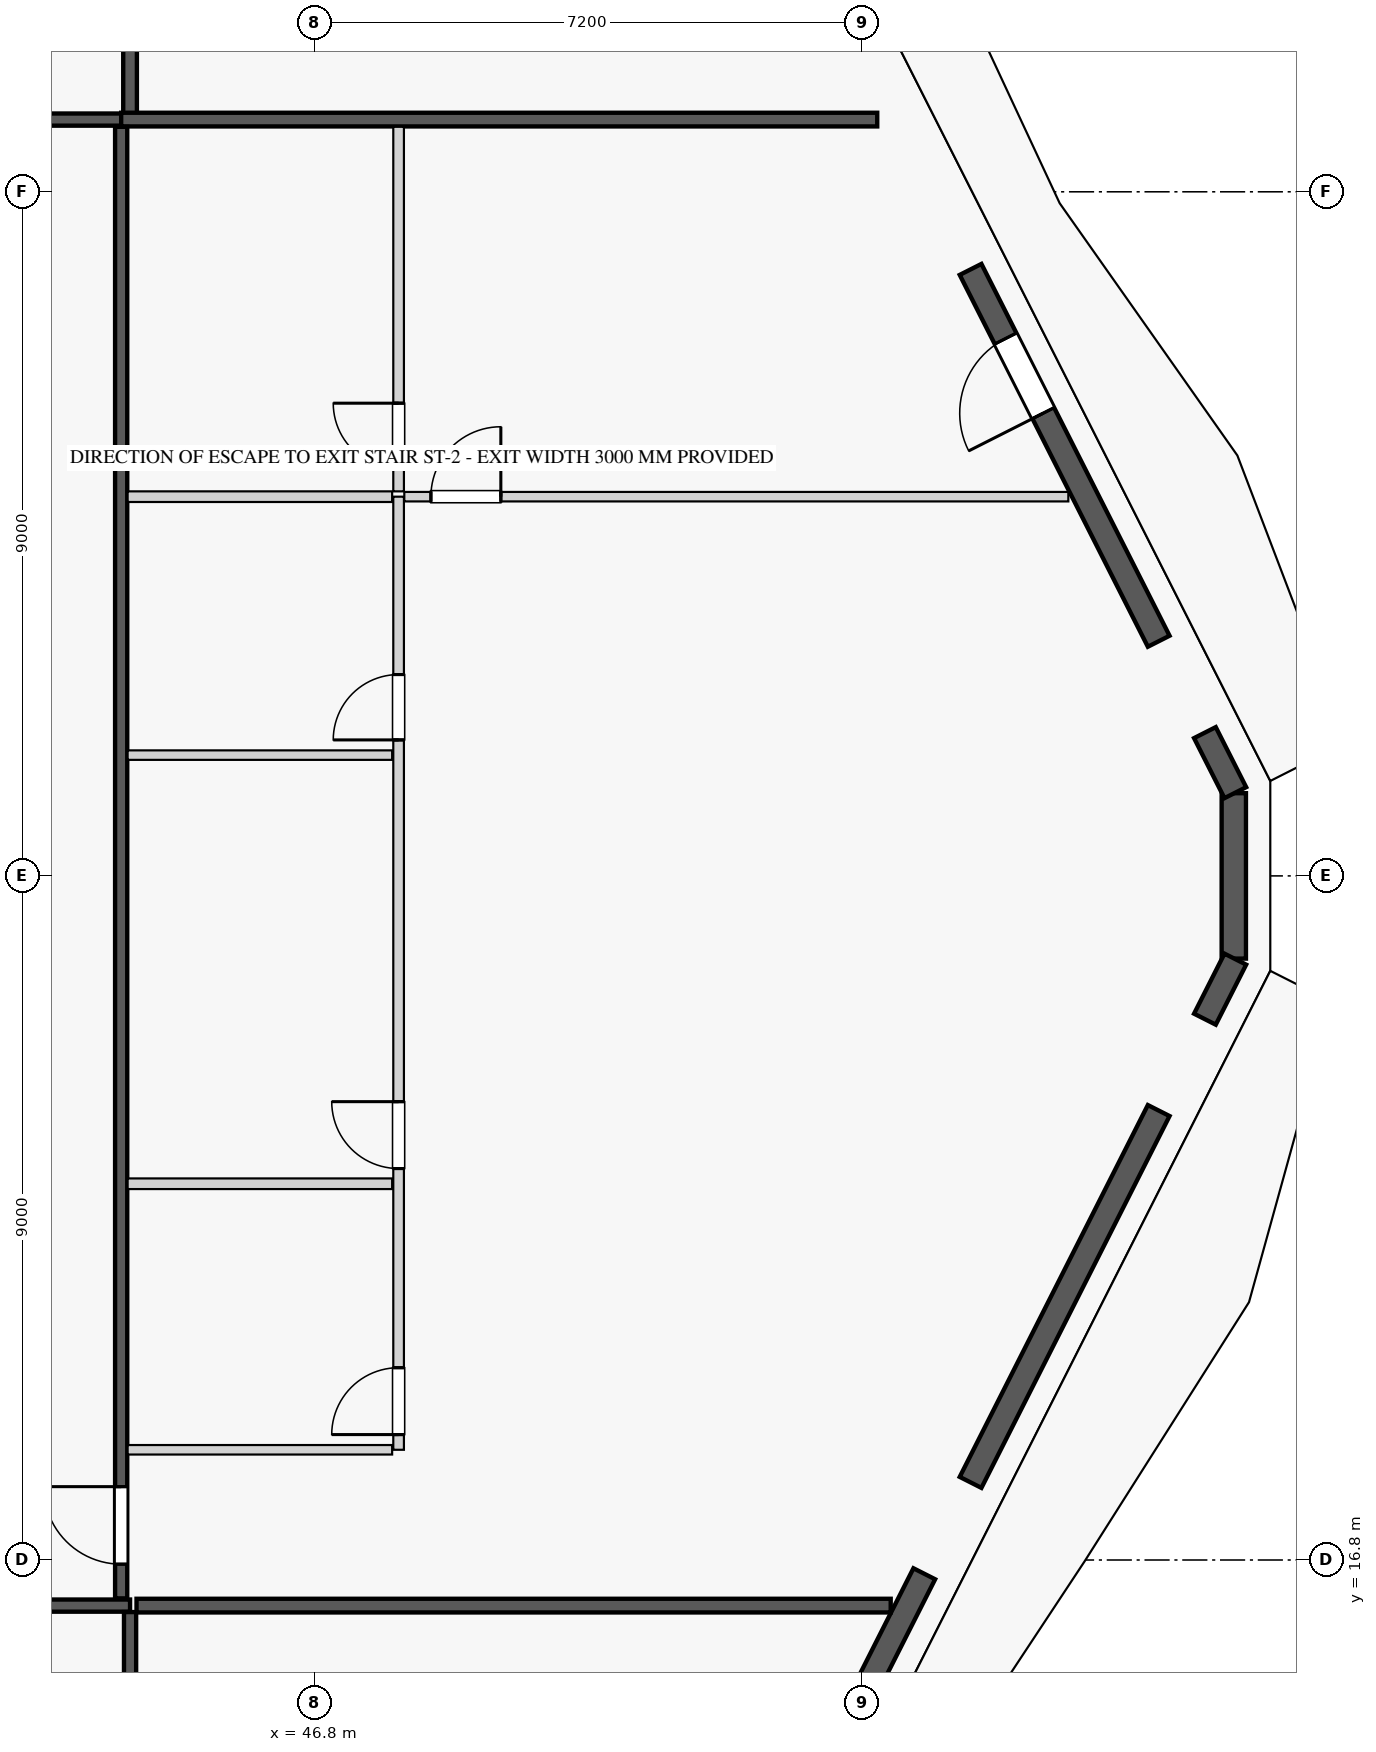
"""IFC4 building model, lengths in metres.
Left out: names, types, materials, properties, quantities, classifications, styles, units other than length and angle.
Written with IfcOpenShell. Run it as: python <this file> out.ifc"""

import sys

from ifc_helpers import new_model, si_unit, direction, frame, frame_2d, origin, origin_2d, place, context, subcontext, project, spatial, rectangle, extrude, element, fill, save


model = new_model("IFC4")
c1 = context("Model", 3, precision=1e-05, world=origin(), true_north=direction((0.0, 1.0)))
c2 = subcontext(c1, "Body", "Model", "MODEL_VIEW")
j1 = project(units=[si_unit("LENGTHUNIT", "METRE"), si_unit("PLANEANGLEUNIT", "RADIAN")], contexts=[c1])
p1 = place(None, origin())
s1 = spatial("IfcSite", under=j1, at=p1, CompositionType="ELEMENT")
p2 = place(p1, origin())
s2 = spatial("IfcBuilding", under=s1, at=p2, CompositionType="ELEMENT")
p3 = place(p2, frame((0.0, 0.0, 94.2)))
s3 = spatial("IfcBuildingStorey", under=s2, at=p3, CompositionType="ELEMENT", Elevation=94.2)
for number, where, z_axis, x_axis in (
    (1, (55.046, 17.22, 0.0), (0.0, 0.0, 1.0), (1.0, 0.0, 0.0)),
    (2, (58.168, 23.314, 0.0), (0.0, 0.0, 1.0), (1.0, 0.0, 0.0)),
    (3, (58.168, 28.286, 0.0), (0.0, 0.0, 1.0), (1.0, 0.0, 0.0)),
    (4, (55.046, 34.38, 0.0), (0.0, 0.0, 1.0), (1.0, 0.0, 0.0)),
):
    element("IfcColumn", number, at=place(p3, frame(where, z_axis=z_axis, x_axis=x_axis)), inside=s3, PredefinedType="COLUMN", context=c2, shape_type="SweptSolid", body=[
        extrude(rectangle(XDim=1.05, YDim=1.05, at=origin_2d()), origin(), (0.0, 0.0, 1.0), 4.2),
    ])
p4 = place(p3, frame((58.168, 25.8, 0.0), z_axis=(0.0, 0.0, 1.0), x_axis=(0.0, 1.0, 0.0)))
e5 = element("IfcColumn", 5, at=p4, inside=s3, PredefinedType="PILASTER", context=c2, shape_type="SweptSolid", body=[
    extrude(rectangle(XDim=0.5, YDim=0.35, at=origin_2d()), origin(), (0.0, 0.0, 1.0), 4.2),
])
p5 = place(p3, frame((58.888, 24.712, 0.0), z_axis=(0.0, 0.0, 1.0), x_axis=(0.0, 1.0, 0.0)))
e6 = element("IfcWall", 6, at=p5, inside=s3, PredefinedType="STANDARD", context=c2, shape_type="SweptSolid", body=[
    extrude(rectangle(XDim=2.176, YDim=0.32, at=frame_2d((1.088, 0.0))), origin(), (0.0, 0.0, 1.0), 3.99),
])
p6 = place(p3, frame((52.231, 11.51, 0.0), z_axis=(0.0, 0.0, 1.0), x_axis=(0.451472515373, 0.892285026134, 0.0)))
e7 = element("IfcWall", 7, at=p6, inside=s3, PredefinedType="STANDARD", context=c2, shape_type="SweptSolid", body=[
    extrude(rectangle(XDim=5.726, YDim=0.32, at=frame_2d((2.863, 0.0))), origin(), (0.0, 0.0, 1.0), 2.59),
])
p7 = place(p6, frame((1.956, 0.0, 0.0)))
e8 = element("IfcOpeningElement", 8, at=p7, cuts=e7, PredefinedType="OPENING", context=c2, shape_type="SweptSolid", body=[
    extrude(rectangle(XDim=1.1, YDim=2.25, at=frame_2d((0.55, 1.125))), frame((0.0, 0.17, 0.0), z_axis=(0.0, -1.0, 0.0), x_axis=(1.0, 0.0, 0.0)), (0.0, 0.0, 1.0), 0.34),
])
p8 = place(p3, frame((55.425, 17.821, 0.0), z_axis=(0.0, 0.0, 1.0), x_axis=(0.451430335802, 0.892306366624, 0.0)))
e9 = element("IfcWall", 9, at=p8, inside=s3, PredefinedType="STANDARD", context=c2, shape_type="SweptSolid", body=[
    extrude(rectangle(XDim=5.482, YDim=0.32, at=frame_2d((2.741, 0.0))), origin(), (0.0, 0.0, 1.0), 2.59),
])
p9 = place(p8, frame((2.191, 0.0, 0.75)))
e10 = element("IfcOpeningElement", 10, at=p9, cuts=e9, PredefinedType="OPENING", context=c2, shape_type="SweptSolid", body=[
    extrude(rectangle(XDim=1.1, YDim=1.69, at=frame_2d((0.55, 0.845))), frame((0.0, 0.17, 0.0), z_axis=(0.0, -1.0, 0.0), x_axis=(1.0, 0.0, 0.0)), (0.0, 0.0, 1.0), 0.34),
])
for number, where, z_axis, x_axis in (
    (11, (58.508, 23.915, 0.0), (0.0, 0.0, 1.0), (0.452, 0.892, 0.0)),
    (12, (58.908, 26.895, 0.0), (0.0, 0.0, 1.0), (-0.452, 0.892, 0.0)),
):
    element("IfcWall", number, at=place(p3, frame(where, z_axis=z_axis, x_axis=x_axis)), inside=s3, PredefinedType="STANDARD", context=c2, shape_type="SweptSolid", body=[
        extrude(rectangle(XDim=0.885, YDim=0.32, at=frame_2d((0.443, 0.0))), origin(), (0.0, 0.0, 1.0), 3.99),
    ])
p10 = place(p3, frame((57.9, 28.887, 0.0), z_axis=(0.0, 0.0, 1.0), x_axis=(-0.451412397928, 0.89231544142, 0.0)))
e13 = element("IfcWall", 13, at=p10, inside=s3, PredefinedType="STANDARD", context=c2, shape_type="SweptSolid", body=[
    extrude(rectangle(XDim=5.482, YDim=0.32, at=frame_2d((2.741, 0.0))), origin(), (0.0, 0.0, 1.0), 2.59),
])
p11 = place(p10, frame((3.363, 0.0, 0.0)))
e14 = element("IfcOpeningElement", 14, at=p11, cuts=e13, PredefinedType="OPENING", context=c2, shape_type="SweptSolid", body=[
    extrude(rectangle(XDim=1.1, YDim=2.25, at=frame_2d((0.55, 1.125))), frame((0.0, 0.17, 0.0), z_axis=(0.0, -1.0, 0.0), x_axis=(1.0, 0.0, 0.0)), (0.0, 0.0, 1.0), 0.34),
])
p12 = place(p10, frame((0.507, 0.0, 0.75)))
e15 = element("IfcOpeningElement", 15, at=p12, cuts=e13, PredefinedType="OPENING", context=c2, shape_type="SweptSolid", body=[
    extrude(rectangle(XDim=1.1, YDim=1.56, at=frame_2d((0.55, 0.78))), frame((0.0, 0.17, 0.0), z_axis=(0.0, -1.0, 0.0), x_axis=(1.0, 0.0, 0.0)), (0.0, 0.0, 1.0), 0.34),
])
p13 = place(p3, frame((20.433, 16.2, 0.0), z_axis=(0.0, 0.0, 1.0), x_axis=(1.0, 0.0, 0.0)))
e16 = element("IfcWall", 16, at=p13, inside=s3, PredefinedType="PARTITIONING", context=c2, shape_type="SweptSolid", body=[
    extrude(rectangle(XDim=23.934, YDim=0.16, at=frame_2d((11.967, 0.0))), origin(), (0.0, 0.0, 1.0), 3.99),
])
p14 = place(p13, frame((0.667, 0.0, 0.0)))
e17 = element("IfcOpeningElement", 17, at=p14, cuts=e16, PredefinedType="OPENING", context=c2, shape_type="SweptSolid", body=[
    extrude(rectangle(XDim=1.35, YDim=2.35, at=frame_2d((0.675, 1.175))), frame((0.0, 0.09, 0.0), z_axis=(0.0, -1.0, 0.0), x_axis=(1.0, 0.0, 0.0)), (0.0, 0.0, 1.0), 0.18),
])
p15 = place(p13, frame((14.039, 0.0, 0.0)))
e18 = element("IfcOpeningElement", 18, at=p15, cuts=e16, PredefinedType="OPENING", context=c2, shape_type="SweptSolid", body=[
    extrude(rectangle(XDim=1.35, YDim=2.35, at=frame_2d((0.675, 1.175))), frame((0.0, 0.09, 0.0), z_axis=(0.0, -1.0, 0.0), x_axis=(1.0, 0.0, 0.0)), (0.0, 0.0, 1.0), 0.18),
])
p16 = place(p3, frame((44.367, 2.365, 0.0), z_axis=(0.0, 0.0, 1.0), x_axis=(0.0, 1.0, 0.0)))
e19 = element("IfcWall", 19, at=p16, inside=s3, PredefinedType="PARTITIONING", context=c2, shape_type="SweptSolid", body=[
    extrude(rectangle(XDim=13.75, YDim=0.16, at=frame_2d((6.875, 0.0))), origin(), (0.0, 0.0, 1.0), 2.59),
])
p17 = place(p3, frame((44.367, 35.75, 0.0), z_axis=(0.0, 0.0, 1.0), x_axis=(0.0, 1.0, 0.0)))
e20 = element("IfcWall", 20, at=p17, inside=s3, PredefinedType="PARTITIONING", context=c2, shape_type="SweptSolid", body=[
    extrude(rectangle(XDim=13.485, YDim=0.18, at=frame_2d((6.743, 0.0))), origin(), (0.0, 0.0, 1.0), 2.59),
])
p18 = place(p3, frame((36.617, 35.75, 0.0), z_axis=(0.0, 0.0, 1.0), x_axis=(1.0, 0.0, 0.0)))
e21 = element("IfcWall", 21, at=p18, inside=s3, PredefinedType="PARTITIONING", context=c2, shape_type="SweptSolid", body=[
    extrude(rectangle(XDim=7.655, YDim=0.16, at=frame_2d((3.828, 0.0))), origin(), (0.0, 0.0, 1.0), 3.99),
])
p19 = place(p18, frame((0.355, 0.0, 0.0)))
e22 = element("IfcOpeningElement", 22, at=p19, cuts=e21, PredefinedType="OPENING", context=c2, shape_type="SweptSolid", body=[
    extrude(rectangle(XDim=1.02, YDim=2.25, at=frame_2d((0.51, 1.125))), frame((0.0, 0.09, 0.0), z_axis=(0.0, -1.0, 0.0), x_axis=(1.0, 0.0, 0.0)), (0.0, 0.0, 1.0), 0.18),
])
p20 = place(p3, frame((44.452, 16.2, 0.0), z_axis=(0.0, 0.0, 1.0), x_axis=(1.0, 0.0, 0.0)))
e23 = element("IfcWall", 23, at=p20, inside=s3, PredefinedType="PARTITIONING", context=c2, shape_type="SweptSolid", body=[
    extrude(rectangle(XDim=9.922, YDim=0.18, at=frame_2d((4.961, 0.0))), origin(), (0.0, 0.0, 1.0), 3.99),
])
p21 = place(p3, frame((44.25, 35.75, 0.0), z_axis=(0.0, 0.0, 1.0), x_axis=(1.0, 0.0, 0.0)))
e24 = element("IfcWall", 24, at=p21, inside=s3, PredefinedType="PARTITIONING", context=c2, shape_type="SweptSolid", body=[
    extrude(rectangle(XDim=9.947, YDim=0.18, at=frame_2d((4.974, 0.0))), origin(), (0.0, 0.0, 1.0), 3.99),
])
p22 = place(p3, frame((44.25, 16.295, 0.0), z_axis=(0.0, 0.0, 1.0), x_axis=(0.0, 1.0, 0.0)))
e25 = element("IfcWall", 25, at=p22, inside=s3, PredefinedType="PARTITIONING", context=c2, shape_type="SweptSolid", body=[
    extrude(rectangle(XDim=19.36, YDim=0.16, at=frame_2d((9.68, 0.0))), origin(), (0.0, 0.0, 1.0), 2.59),
])
p23 = place(p22, frame((0.45, 0.0, 0.0)))
e26 = element("IfcOpeningElement", 26, at=p23, cuts=e25, PredefinedType="OPENING", context=c2, shape_type="SweptSolid", body=[
    extrude(rectangle(XDim=1.02, YDim=2.25, at=frame_2d((0.51, 1.125))), frame((0.0, 0.09, 0.0), z_axis=(0.0, -1.0, 0.0), x_axis=(1.0, 0.0, 0.0)), (0.0, 0.0, 1.0), 0.18),
])
p24 = place(p3, frame((44.335, 18.25, 0.0), z_axis=(0.0, 0.0, 1.0), x_axis=(1.0, 0.0, 0.0)))
e27 = element("IfcWall", 27, at=p24, inside=s3, PredefinedType="PARTITIONING", context=c2, shape_type="SweptSolid", body=[
    extrude(rectangle(XDim=3.48, YDim=0.125, at=frame_2d((1.74, 0.0))), origin(), (0.0, 0.0, 1.0), 2.59),
])
p25 = place(p3, frame((47.9, 18.25, 0.0), z_axis=(0.0, 0.0, 1.0), x_axis=(0.0, 1.0, 0.0)))
e28 = element("IfcWall", 28, at=p25, inside=s3, PredefinedType="PLUMBINGWALL", context=c2, shape_type="SweptSolid", body=[
    extrude(rectangle(XDim=12.539, YDim=0.14, at=frame_2d((6.27, 0.0))), origin(), (0.0, 0.0, 1.0), 3.99),
])
p26 = place(p25, frame((0.2, 0.0, 0.0)))
e29 = element("IfcOpeningElement", 29, at=p26, cuts=e28, PredefinedType="OPENING", context=c2, shape_type="SweptSolid", body=[
    extrude(rectangle(XDim=0.88, YDim=2.15, at=frame_2d((0.44, 1.075))), frame((0.0, 0.08, 0.0), z_axis=(0.0, -1.0, 0.0), x_axis=(1.0, 0.0, 0.0)), (0.0, 0.0, 1.0), 0.16),
])
p27 = place(p25, frame((3.7, 0.0, 0.0)))
e30 = element("IfcOpeningElement", 30, at=p27, cuts=e28, PredefinedType="OPENING", context=c2, shape_type="SweptSolid", body=[
    extrude(rectangle(XDim=0.88, YDim=2.15, at=frame_2d((0.44, 1.075))), frame((0.0, 0.08, 0.0), z_axis=(0.0, -1.0, 0.0), x_axis=(1.0, 0.0, 0.0)), (0.0, 0.0, 1.0), 0.16),
])
p28 = place(p25, frame((9.339, 0.0, 0.0)))
e31 = element("IfcOpeningElement", 31, at=p28, cuts=e28, PredefinedType="OPENING", context=c2, shape_type="SweptSolid", body=[
    extrude(rectangle(XDim=0.86, YDim=2.1, at=frame_2d((0.43, 1.05))), frame((0.0, 0.08, 0.0), z_axis=(0.0, -1.0, 0.0), x_axis=(1.0, 0.0, 0.0)), (0.0, 0.0, 1.0), 0.16),
])
p29 = place(p3, frame((47.9, 30.859, 0.0), z_axis=(0.0, 0.0, 1.0), x_axis=(0.0, 1.0, 0.0)))
e32 = element("IfcWall", 32, at=p29, inside=s3, PredefinedType="PLUMBINGWALL", context=c2, shape_type="SweptSolid", body=[
    extrude(rectangle(XDim=4.796, YDim=0.14, at=frame_2d((2.398, 0.0))), origin(), (0.0, 0.0, 1.0), 3.99),
])
p30 = place(p29, frame((0.3, 0.0, 0.0)))
e33 = element("IfcOpeningElement", 33, at=p30, cuts=e32, PredefinedType="OPENING", context=c2, shape_type="SweptSolid", body=[
    extrude(rectangle(XDim=0.86, YDim=2.1, at=frame_2d((0.43, 1.05))), frame((0.0, 0.08, 0.0), z_axis=(0.0, -1.0, 0.0), x_axis=(1.0, 0.0, 0.0)), (0.0, 0.0, 1.0), 0.16),
])
p31 = place(p3, frame((44.335, 30.789, 0.0), z_axis=(0.0, 0.0, 1.0), x_axis=(1.0, 0.0, 0.0)))
e34 = element("IfcWall", 34, at=p31, inside=s3, PredefinedType="PLUMBINGWALL", context=c2, shape_type="SweptSolid", body=[
    extrude(rectangle(XDim=3.48, YDim=0.14, at=frame_2d((1.74, 0.0))), origin(), (0.0, 0.0, 1.0), 3.99),
])
p32 = place(p3, frame((47.975, 30.789, 0.0), z_axis=(0.0, 0.0, 1.0), x_axis=(1.0, 0.0, 0.0)))
e35 = element("IfcWall", 35, at=p32, inside=s3, PredefinedType="PARTITIONING", context=c2, shape_type="SweptSolid", body=[
    extrude(rectangle(XDim=8.736, YDim=0.125, at=frame_2d((4.368, 0.0))), origin(), (0.0, 0.0, 1.0), 3.99),
])
p33 = place(p32, frame((0.35, 0.0, 0.0)))
e36 = element("IfcOpeningElement", 36, at=p33, cuts=e35, PredefinedType="OPENING", context=c2, shape_type="SweptSolid", body=[
    extrude(rectangle(XDim=0.92, YDim=2.15, at=frame_2d((0.46, 1.075))), frame((0.0, 0.073, 0.0), z_axis=(0.0, -1.0, 0.0), x_axis=(1.0, 0.0, 0.0)), (0.0, 0.0, 1.0), 0.145),
])
p34 = place(p3, frame((44.335, 21.75, 0.0), z_axis=(0.0, 0.0, 1.0), x_axis=(1.0, 0.0, 0.0)))
e37 = element("IfcWall", 37, at=p34, inside=s3, PredefinedType="PLUMBINGWALL", context=c2, shape_type="SweptSolid", body=[
    extrude(rectangle(XDim=3.48, YDim=0.14, at=frame_2d((1.74, 0.0))), origin(), (0.0, 0.0, 1.0), 3.99),
])
p35 = place(p3, frame((44.335, 27.389, 0.0), z_axis=(0.0, 0.0, 1.0), x_axis=(1.0, 0.0, 0.0)))
e38 = element("IfcWall", 38, at=p35, inside=s3, PredefinedType="PARTITIONING", context=c2, shape_type="SweptSolid", body=[
    extrude(rectangle(XDim=3.48, YDim=0.125, at=frame_2d((1.74, 0.0))), origin(), (0.0, 0.0, 1.0), 3.99),
])
p36 = place(p9, origin())
e39 = element("IfcWindow", 39, at=p36, inside=s3, PartitioningType="SINGLE_PANEL", PredefinedType="WINDOW", context=c2, shape_type="SweptSolid", body=[
    extrude(rectangle(XDim=1.1, YDim=1.69, at=frame_2d((0.55, 0.845))), frame((0.0, 0.03, 0.0), z_axis=(0.0, -1.0, 0.0), x_axis=(1.0, 0.0, 0.0)), (0.0, 0.0, 1.0), 0.06),
])
fill(e10, e39)
p37 = place(p11, origin())
e40 = element("IfcDoor", 40, at=p37, inside=s3, OperationType="SINGLE_SWING_LEFT", PredefinedType="DOOR", context=c2, shape_type="SweptSolid", body=[
    extrude(rectangle(XDim=1.1, YDim=2.25, at=frame_2d((0.55, 1.125))), frame((0.0, 0.025, 0.0), z_axis=(0.0, -1.0, 0.0), x_axis=(1.0, 0.0, 0.0)), (0.0, 0.0, 1.0), 0.05),
])
fill(e14, e40)
p38 = place(p26, origin())
e41 = element("IfcDoor", 41, at=p38, inside=s3, OperationType="SINGLE_SWING_LEFT", PredefinedType="DOOR", context=c2, shape_type="SweptSolid", body=[
    extrude(rectangle(XDim=0.88, YDim=2.15, at=frame_2d((0.44, 1.075))), frame((0.0, 0.025, 0.0), z_axis=(0.0, -1.0, 0.0), x_axis=(1.0, 0.0, 0.0)), (0.0, 0.0, 1.0), 0.05),
])
fill(e29, e41)
p39 = place(p27, origin())
e42 = element("IfcDoor", 42, at=p39, inside=s3, OperationType="SINGLE_SWING_RIGHT", PredefinedType="DOOR", context=c2, shape_type="SweptSolid", body=[
    extrude(rectangle(XDim=0.88, YDim=2.15, at=frame_2d((0.44, 1.075))), frame((0.0, 0.025, 0.0), z_axis=(0.0, -1.0, 0.0), x_axis=(1.0, 0.0, 0.0)), (0.0, 0.0, 1.0), 0.05),
])
fill(e30, e42)
p40 = place(p28, origin())
e43 = element("IfcDoor", 43, at=p40, inside=s3, OperationType="SINGLE_SWING_LEFT", PredefinedType="DOOR", context=c2, shape_type="SweptSolid", body=[
    extrude(rectangle(XDim=0.86, YDim=2.1, at=frame_2d((0.43, 1.05))), frame((0.0, 0.025, 0.0), z_axis=(0.0, -1.0, 0.0), x_axis=(1.0, 0.0, 0.0)), (0.0, 0.0, 1.0), 0.05),
])
fill(e31, e43)
p41 = place(p30, origin())
e44 = element("IfcDoor", 44, at=p41, inside=s3, OperationType="SINGLE_SWING_RIGHT", PredefinedType="DOOR", context=c2, shape_type="SweptSolid", body=[
    extrude(rectangle(XDim=0.86, YDim=2.1, at=frame_2d((0.43, 1.05))), frame((0.0, 0.025, 0.0), z_axis=(0.0, -1.0, 0.0), x_axis=(1.0, 0.0, 0.0)), (0.0, 0.0, 1.0), 0.05),
])
fill(e33, e44)
p42 = place(p23, origin())
e45 = element("IfcDoor", 45, at=p42, inside=s3, OperationType="SINGLE_SWING_RIGHT", PredefinedType="DOOR", context=c2, shape_type="SweptSolid", body=[
    extrude(rectangle(XDim=1.02, YDim=2.25, at=frame_2d((0.51, 1.125))), frame((0.0, 0.025, 0.0), z_axis=(0.0, -1.0, 0.0), x_axis=(1.0, 0.0, 0.0)), (0.0, 0.0, 1.0), 0.05),
])
fill(e26, e45)
p43 = place(p33, origin())
e46 = element("IfcDoor", 46, at=p43, inside=s3, OperationType="SINGLE_SWING_RIGHT", PredefinedType="DOOR", context=c2, shape_type="SweptSolid", body=[
    extrude(rectangle(XDim=0.92, YDim=2.15, at=frame_2d((0.46, 1.075))), frame((0.0, 0.025, 0.0), z_axis=(0.0, -1.0, 0.0), x_axis=(1.0, 0.0, 0.0)), (0.0, 0.0, 1.0), 0.05),
])
fill(e36, e46)
p44 = place(p12, origin())
e47 = element("IfcWindow", 47, at=p44, inside=s3, PartitioningType="SINGLE_PANEL", PredefinedType="WINDOW", context=c2, shape_type="SweptSolid", body=[
    extrude(rectangle(XDim=1.1, YDim=1.56, at=frame_2d((0.55, 0.78))), frame((0.0, 0.03, 0.0), z_axis=(0.0, -1.0, 0.0), x_axis=(1.0, 0.0, 0.0)), (0.0, 0.0, 1.0), 0.06),
])
fill(e15, e47)
save(model, sys.argv[1])
